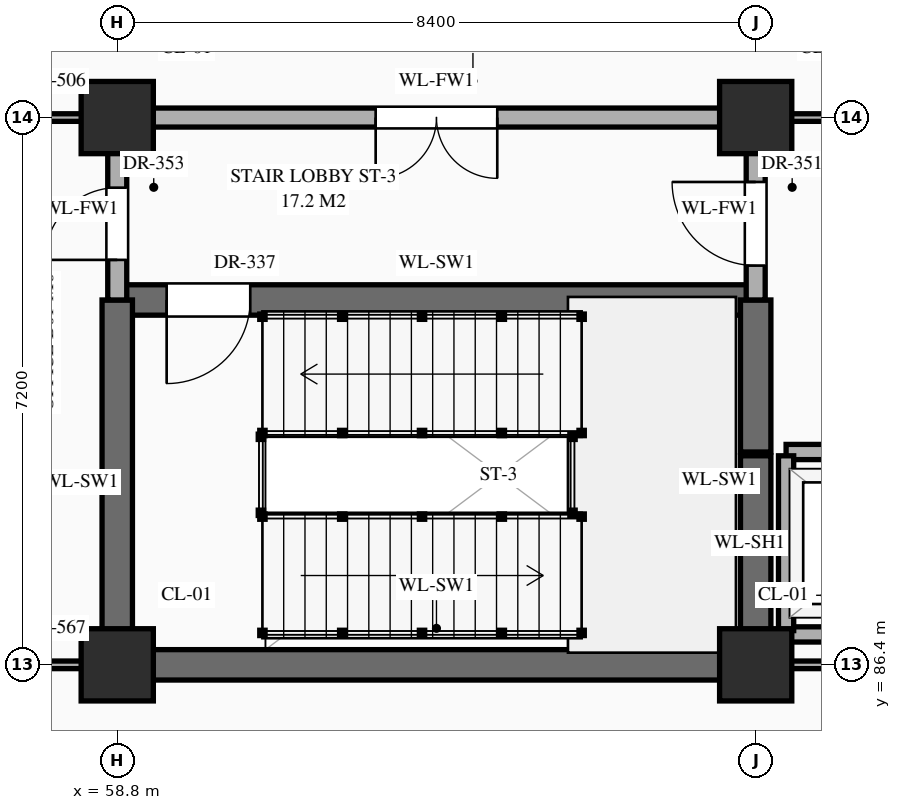
"""IFC4 building model, lengths in metres.
Left out: names, types, materials, properties, quantities, classifications, styles, units other than length and angle.
Written with IfcOpenShell. Run it as: python <this file> out.ifc"""

import sys

from ifc_helpers import new_model, si_unit, direction, frame, frame_2d, origin, origin_2d, place, context, subcontext, project, spatial, rectangle, extrude, element, fill, save


model = new_model("IFC4")
c1 = context("Model", 3, precision=1e-05, world=origin(), true_north=direction((0.0, 1.0)))
c2 = subcontext(c1, "Body", "Model", "MODEL_VIEW")
j1 = project(units=[si_unit("LENGTHUNIT", "METRE"), si_unit("PLANEANGLEUNIT", "RADIAN")], contexts=[c1])
p1 = place(None, origin())
s1 = spatial("IfcSite", under=j1, at=p1, CompositionType="ELEMENT")
p2 = place(p1, origin())
s2 = spatial("IfcBuilding", under=s1, at=p2, CompositionType="ELEMENT")
p3 = place(p2, frame((0.0, 0.0, -5.4)))
s3 = spatial("IfcBuildingStorey", under=s2, at=p3, CompositionType="ELEMENT", Elevation=-5.4)
for number, where, z_axis, x_axis in (
    (1, (58.8, 86.4, 0.0), (0.0, 0.0, 1.0), (1.0, 0.0, 0.0)),
    (2, (58.8, 93.6, 0.0), (0.0, 0.0, 1.0), (1.0, 0.0, 0.0)),
    (3, (67.2, 86.4, 0.0), (0.0, 0.0, 1.0), (1.0, 0.0, 0.0)),
    (4, (67.2, 93.6, 0.0), (0.0, 0.0, 1.0), (1.0, 0.0, 0.0)),
):
    element("IfcColumn", number, at=place(p3, frame(where, z_axis=z_axis, x_axis=x_axis)), inside=s3, PredefinedType="COLUMN", context=c2, shape_type="SweptSolid", body=[
        extrude(rectangle(XDim=0.95, YDim=0.95, at=origin_2d()), origin(), (0.0, 0.0, 1.0), 5.4),
    ])
p4 = place(p3, frame((50.4, 86.4, 0.0), z_axis=(0.0, 0.0, 1.0), x_axis=(1.0, 0.0, 0.0)))
e5 = element("IfcWall", 5, at=p4, inside=s3, PredefinedType="STANDARD", context=c2, shape_type="SweptSolid", body=[
    extrude(rectangle(XDim=8.4, YDim=0.1, at=frame_2d((4.2, 0.0))), origin(), (0.0, 0.0, 1.0), 4.25),
])
p5 = place(p4, frame((1.117, 0.0, 0.0)))
e6 = element("IfcOpeningElement", 6, at=p5, cuts=e5, PredefinedType="OPENING", context=c2, shape_type="SweptSolid", body=[
    extrude(rectangle(XDim=0.96, YDim=2.2, at=frame_2d((0.48, 1.1))), frame((0.0, 0.062, 0.0), z_axis=(0.0, -1.0, 0.0), x_axis=(1.0, 0.0, 0.0)), (0.0, 0.0, 1.0), 0.124),
])
p6 = place(p4, frame((3.68, 0.0, 0.0)))
e7 = element("IfcOpeningElement", 7, at=p6, cuts=e5, PredefinedType="OPENING", context=c2, shape_type="SweptSolid", body=[
    extrude(rectangle(XDim=1.04, YDim=2.2, at=frame_2d((0.52, 1.1))), frame((0.0, 0.062, 0.0), z_axis=(0.0, -1.0, 0.0), x_axis=(1.0, 0.0, 0.0)), (0.0, 0.0, 1.0), 0.124),
])
p7 = place(p4, frame((6.262, 0.0, 0.0)))
e8 = element("IfcOpeningElement", 8, at=p7, cuts=e5, PredefinedType="OPENING", context=c2, shape_type="SweptSolid", body=[
    extrude(rectangle(XDim=1.08, YDim=2.25, at=frame_2d((0.54, 1.125))), frame((0.0, 0.062, 0.0), z_axis=(0.0, -1.0, 0.0), x_axis=(1.0, 0.0, 0.0)), (0.0, 0.0, 1.0), 0.124),
])
p8 = place(p3, frame((58.8, 86.4, 0.0), z_axis=(0.0, 0.0, 1.0), x_axis=(1.0, 0.0, 0.0)))
e9 = element("IfcWall", 9, at=p8, inside=s3, PredefinedType="SHEAR", context=c2, shape_type="SweptSolid", body=[
    extrude(rectangle(XDim=8.4, YDim=0.4, at=frame_2d((4.2, 0.0))), origin(), (0.0, 0.0, 1.0), 5.1),
])
p9 = place(p3, frame((67.25, 86.4, 0.0), z_axis=(0.0, 0.0, 1.0), x_axis=(1.0, 0.0, 0.0)))
e10 = element("IfcWall", 10, at=p9, inside=s3, PredefinedType="STANDARD", context=c2, shape_type="SweptSolid", body=[
    extrude(rectangle(XDim=8.3, YDim=0.1, at=frame_2d((4.15, 0.0))), origin(), (0.0, 0.0, 1.0), 4.25),
])
p10 = place(p3, frame((67.6, 86.8, 0.0), z_axis=(0.0, 0.0, 1.0), x_axis=(1.0, 0.0, 0.0)))
e11 = element("IfcWall", 11, at=p10, inside=s3, PredefinedType="STANDARD", context=c2, shape_type="SweptSolid", body=[
    extrude(rectangle(XDim=2.5, YDim=0.2, at=frame_2d((1.25, 0.0))), origin(), (0.0, 0.0, 1.0), 5.1),
])
p11 = place(p3, frame((67.6, 89.2, 0.0), z_axis=(0.0, 0.0, 1.0), x_axis=(1.0, 0.0, 0.0)))
e12 = element("IfcWall", 12, at=p11, inside=s3, PredefinedType="STANDARD", context=c2, shape_type="SweptSolid", body=[
    extrude(rectangle(XDim=7.7, YDim=0.2, at=frame_2d((3.85, 0.0))), origin(), (0.0, 0.0, 1.0), 5.1),
])
p12 = place(p11, frame((0.725, 0.0, 0.0)))
e13 = element("IfcOpeningElement", 13, at=p12, cuts=e12, PredefinedType="OPENING", context=c2, shape_type="SweptSolid", body=[
    extrude(rectangle(XDim=1.1, YDim=2.15, at=frame_2d((0.55, 1.075))), frame((0.0, 0.112, 0.0), z_axis=(0.0, -1.0, 0.0), x_axis=(1.0, 0.0, 0.0)), (0.0, 0.0, 1.0), 0.224),
])
p13 = place(p11, frame((3.3, 0.0, 0.0)))
e14 = element("IfcOpeningElement", 14, at=p13, cuts=e12, PredefinedType="OPENING", context=c2, shape_type="SweptSolid", body=[
    extrude(rectangle(XDim=1.1, YDim=2.15, at=frame_2d((0.55, 1.075))), frame((0.0, 0.112, 0.0), z_axis=(0.0, -1.0, 0.0), x_axis=(1.0, 0.0, 0.0)), (0.0, 0.0, 1.0), 0.224),
])
p14 = place(p11, frame((5.875, 0.0, 0.0)))
e15 = element("IfcOpeningElement", 15, at=p14, cuts=e12, PredefinedType="OPENING", context=c2, shape_type="SweptSolid", body=[
    extrude(rectangle(XDim=1.1, YDim=2.15, at=frame_2d((0.55, 1.075))), frame((0.0, 0.112, 0.0), z_axis=(0.0, -1.0, 0.0), x_axis=(1.0, 0.0, 0.0)), (0.0, 0.0, 1.0), 0.224),
])
p15 = place(p3, frame((58.8, 91.2, 0.0), z_axis=(0.0, 0.0, 1.0), x_axis=(1.0, 0.0, 0.0)))
e16 = element("IfcWall", 16, at=p15, inside=s3, PredefinedType="SHEAR", context=c2, shape_type="SweptSolid", body=[
    extrude(rectangle(XDim=8.4, YDim=0.4, at=frame_2d((4.2, 0.0))), origin(), (0.0, 0.0, 1.0), 5.1),
])
p16 = place(p15, frame((0.65, 0.0, 0.0)))
e17 = element("IfcOpeningElement", 17, at=p16, cuts=e16, PredefinedType="OPENING", context=c2, shape_type="SweptSolid", body=[
    extrude(rectangle(XDim=1.1, YDim=2.2, at=frame_2d((0.55, 1.1))), frame((0.0, 0.212, 0.0), z_axis=(0.0, -1.0, 0.0), x_axis=(1.0, 0.0, 0.0)), (0.0, 0.0, 1.0), 0.424),
])
p17 = place(p3, frame((50.4, 93.6, 0.0), z_axis=(0.0, 0.0, 1.0), x_axis=(1.0, 0.0, 0.0)))
e18 = element("IfcWall", 18, at=p17, inside=s3, PredefinedType="STANDARD", context=c2, shape_type="SweptSolid", body=[
    extrude(rectangle(XDim=8.4, YDim=0.1, at=frame_2d((4.2, 0.0))), origin(), (0.0, 0.0, 1.0), 4.25),
])
p18 = place(p17, frame((0.958, 0.0, 0.0)))
e19 = element("IfcOpeningElement", 19, at=p18, cuts=e18, PredefinedType="OPENING", context=c2, shape_type="SweptSolid", body=[
    extrude(rectangle(XDim=1.28, YDim=2.35, at=frame_2d((0.64, 1.175))), frame((0.0, 0.062, 0.0), z_axis=(0.0, -1.0, 0.0), x_axis=(1.0, 0.0, 0.0)), (0.0, 0.0, 1.0), 0.124),
])
p19 = place(p17, frame((3.73, 0.0, 0.0)))
e20 = element("IfcOpeningElement", 20, at=p19, cuts=e18, PredefinedType="OPENING", context=c2, shape_type="SweptSolid", body=[
    extrude(rectangle(XDim=0.94, YDim=2.3, at=frame_2d((0.47, 1.15))), frame((0.0, 0.062, 0.0), z_axis=(0.0, -1.0, 0.0), x_axis=(1.0, 0.0, 0.0)), (0.0, 0.0, 1.0), 0.124),
])
p20 = place(p17, frame((6.312, 0.0, 0.0)))
e21 = element("IfcOpeningElement", 21, at=p20, cuts=e18, PredefinedType="OPENING", context=c2, shape_type="SweptSolid", body=[
    extrude(rectangle(XDim=0.98, YDim=2.35, at=frame_2d((0.49, 1.175))), frame((0.0, 0.062, 0.0), z_axis=(0.0, -1.0, 0.0), x_axis=(1.0, 0.0, 0.0)), (0.0, 0.0, 1.0), 0.124),
])
p21 = place(p3, frame((58.8, 93.6, 0.0), z_axis=(0.0, 0.0, 1.0), x_axis=(1.0, 0.0, 0.0)))
e22 = element("IfcWall", 22, at=p21, inside=s3, PredefinedType="STANDARD", context=c2, shape_type="SweptSolid", body=[
    extrude(rectangle(XDim=8.4, YDim=0.25, at=frame_2d((4.2, 0.0))), origin(), (0.0, 0.0, 1.0), 4.25),
])
p22 = place(p21, frame((3.4, 0.0, 0.0)))
e23 = element("IfcOpeningElement", 23, at=p22, cuts=e22, PredefinedType="OPENING", context=c2, shape_type="SweptSolid", body=[
    extrude(rectangle(XDim=1.6, YDim=2.3, at=frame_2d((0.8, 1.15))), frame((0.0, 0.137, 0.0), z_axis=(0.0, -1.0, 0.0), x_axis=(1.0, 0.0, 0.0)), (0.0, 0.0, 1.0), 0.274),
])
p23 = place(p3, frame((67.2, 93.6, 0.0), z_axis=(0.0, 0.0, 1.0), x_axis=(1.0, 0.0, 0.0)))
e24 = element("IfcWall", 24, at=p23, inside=s3, PredefinedType="STANDARD", context=c2, shape_type="SweptSolid", body=[
    extrude(rectangle(XDim=33.6, YDim=0.1, at=frame_2d((16.8, 0.0))), origin(), (0.0, 0.0, 1.0), 4.25),
])
p24 = place(p23, frame((3.425, 0.0, 0.0)))
e25 = element("IfcOpeningElement", 25, at=p24, cuts=e24, PredefinedType="OPENING", context=c2, shape_type="SweptSolid", body=[
    extrude(rectangle(XDim=1.55, YDim=2.35, at=frame_2d((0.775, 1.175))), frame((0.0, 0.062, 0.0), z_axis=(0.0, -1.0, 0.0), x_axis=(1.0, 0.0, 0.0)), (0.0, 0.0, 1.0), 0.124),
])
p25 = place(p23, frame((28.55, 0.0, 0.0)))
e26 = element("IfcOpeningElement", 26, at=p25, cuts=e24, PredefinedType="OPENING", context=c2, shape_type="SweptSolid", body=[
    extrude(rectangle(XDim=1.7, YDim=2.45, at=frame_2d((0.85, 1.225))), frame((0.0, 0.062, 0.0), z_axis=(0.0, -1.0, 0.0), x_axis=(1.0, 0.0, 0.0)), (0.0, 0.0, 1.0), 0.124),
])
p26 = place(p23, frame((11.875, 0.0, 0.0)))
e27 = element("IfcOpeningElement", 27, at=p26, cuts=e24, PredefinedType="OPENING", context=c2, shape_type="SweptSolid", body=[
    extrude(rectangle(XDim=1.45, YDim=2.3, at=frame_2d((0.725, 1.15))), frame((0.0, 0.062, 0.0), z_axis=(0.0, -1.0, 0.0), x_axis=(1.0, 0.0, 0.0)), (0.0, 0.0, 1.0), 0.124),
])
p27 = place(p23, frame((17.857, 0.0, 0.0)))
e28 = element("IfcOpeningElement", 28, at=p27, cuts=e24, PredefinedType="OPENING", context=c2, shape_type="SweptSolid", body=[
    extrude(rectangle(XDim=1.08, YDim=2.25, at=frame_2d((0.54, 1.125))), frame((0.0, 0.062, 0.0), z_axis=(0.0, -1.0, 0.0), x_axis=(1.0, 0.0, 0.0)), (0.0, 0.0, 1.0), 0.124),
])
p28 = place(p23, frame((20.44, 0.0, 0.0)))
e29 = element("IfcOpeningElement", 29, at=p28, cuts=e24, PredefinedType="OPENING", context=c2, shape_type="SweptSolid", body=[
    extrude(rectangle(XDim=1.12, YDim=2.25, at=frame_2d((0.56, 1.125))), frame((0.0, 0.062, 0.0), z_axis=(0.0, -1.0, 0.0), x_axis=(1.0, 0.0, 0.0)), (0.0, 0.0, 1.0), 0.124),
])
p29 = place(p23, frame((23.022, 0.0, 0.0)))
e30 = element("IfcOpeningElement", 30, at=p29, cuts=e24, PredefinedType="OPENING", context=c2, shape_type="SweptSolid", body=[
    extrude(rectangle(XDim=1.16, YDim=2.3, at=frame_2d((0.58, 1.15))), frame((0.0, 0.062, 0.0), z_axis=(0.0, -1.0, 0.0), x_axis=(1.0, 0.0, 0.0)), (0.0, 0.0, 1.0), 0.124),
])
p30 = place(p3, frame((58.8, 86.4, 0.0), z_axis=(0.0, 0.0, 1.0), x_axis=(0.0, 1.0, 0.0)))
e31 = element("IfcWall", 31, at=p30, inside=s3, PredefinedType="SHEAR", context=c2, shape_type="SweptSolid", body=[
    extrude(rectangle(XDim=4.8, YDim=0.4, at=frame_2d((2.4, 0.0))), origin(), (0.0, 0.0, 1.0), 5.1),
])
p31 = place(p3, frame((58.8, 91.2, 0.0), z_axis=(0.0, 0.0, 1.0), x_axis=(0.0, 1.0, 0.0)))
e32 = element("IfcWall", 32, at=p31, inside=s3, PredefinedType="STANDARD", context=c2, shape_type="SweptSolid", body=[
    extrude(rectangle(XDim=2.4, YDim=0.25, at=frame_2d((1.2, 0.0))), origin(), (0.0, 0.0, 1.0), 4.35),
])
p32 = place(p31, frame((0.528, 0.0, 0.0)))
e33 = element("IfcOpeningElement", 33, at=p32, cuts=e32, PredefinedType="OPENING", context=c2, shape_type="SweptSolid", body=[
    extrude(rectangle(XDim=0.95, YDim=2.15, at=frame_2d((0.475, 1.075))), frame((0.0, 0.137, 0.0), z_axis=(0.0, -1.0, 0.0), x_axis=(1.0, 0.0, 0.0)), (0.0, 0.0, 1.0), 0.274),
])
p33 = place(p3, frame((67.2, 86.45, 0.0), z_axis=(0.0, 0.0, 1.0), x_axis=(0.0, 1.0, 0.0)))
e34 = element("IfcWall", 34, at=p33, inside=s3, PredefinedType="SHEAR", context=c2, shape_type="SweptSolid", body=[
    extrude(rectangle(XDim=2.7, YDim=0.4, at=frame_2d((1.35, 0.0))), origin(), (0.0, 0.0, 1.0), 5.1),
])
p34 = place(p3, frame((67.2, 89.2, 0.0), z_axis=(0.0, 0.0, 1.0), x_axis=(0.0, 1.0, 0.0)))
e35 = element("IfcWall", 35, at=p34, inside=s3, PredefinedType="SHEAR", context=c2, shape_type="SweptSolid", body=[
    extrude(rectangle(XDim=2.0, YDim=0.4, at=frame_2d((1.0, 0.0))), origin(), (0.0, 0.0, 1.0), 5.1),
])
p35 = place(p3, frame((67.2, 91.2, 0.0), z_axis=(0.0, 0.0, 1.0), x_axis=(0.0, 1.0, 0.0)))
e36 = element("IfcWall", 36, at=p35, inside=s3, PredefinedType="STANDARD", context=c2, shape_type="SweptSolid", body=[
    extrude(rectangle(XDim=2.4, YDim=0.25, at=frame_2d((1.2, 0.0))), origin(), (0.0, 0.0, 1.0), 4.35),
])
p36 = place(p35, frame((0.452, 0.0, 0.0)))
e37 = element("IfcOpeningElement", 37, at=p36, cuts=e36, PredefinedType="OPENING", context=c2, shape_type="SweptSolid", body=[
    extrude(rectangle(XDim=1.1, YDim=2.2, at=frame_2d((0.55, 1.1))), frame((0.0, 0.137, 0.0), z_axis=(0.0, -1.0, 0.0), x_axis=(1.0, 0.0, 0.0)), (0.0, 0.0, 1.0), 0.274),
])
p37 = place(p3, frame((67.6, 86.85, 0.0), z_axis=(0.0, 0.0, 1.0), x_axis=(0.0, 1.0, 0.0)))
e38 = element("IfcWall", 38, at=p37, inside=s3, PredefinedType="STANDARD", context=c2, shape_type="SweptSolid", body=[
    extrude(rectangle(XDim=2.3, YDim=0.2, at=frame_2d((1.15, 0.0))), origin(), (0.0, 0.0, 1.0), 5.1),
])
p38 = place(p16, frame((1.1, 0.0, 0.0), z_axis=(0.0, 0.0, 1.0), x_axis=(-1.0, 0.0, 0.0)))
e39 = element("IfcDoor", 39, at=p38, inside=s3, OperationType="SINGLE_SWING_RIGHT", PredefinedType="DOOR", context=c2, shape_type="SweptSolid", body=[
    extrude(rectangle(XDim=1.1, YDim=2.2, at=frame_2d((0.55, 1.1))), frame((0.0, 0.025, 0.0), z_axis=(0.0, -1.0, 0.0), x_axis=(1.0, 0.0, 0.0)), (0.0, 0.0, 1.0), 0.05),
])
fill(e17, e39)
p39 = place(p36, origin())
e40 = element("IfcDoor", 40, at=p39, inside=s3, OperationType="SINGLE_SWING_RIGHT", PredefinedType="DOOR", context=c2, shape_type="SweptSolid", body=[
    extrude(rectangle(XDim=1.1, YDim=2.2, at=frame_2d((0.55, 1.1))), frame((0.0, 0.025, 0.0), z_axis=(0.0, -1.0, 0.0), x_axis=(1.0, 0.0, 0.0)), (0.0, 0.0, 1.0), 0.05),
])
fill(e37, e40)
p40 = place(p22, frame((1.6, 0.0, 0.0), z_axis=(0.0, 0.0, 1.0), x_axis=(-1.0, 0.0, 0.0)))
e41 = element("IfcDoor", 41, at=p40, inside=s3, OperationType="DOUBLE_DOOR_SINGLE_SWING", PredefinedType="DOOR", context=c2, shape_type="SweptSolid", body=[
    extrude(rectangle(XDim=1.6, YDim=2.3, at=frame_2d((0.8, 1.15))), frame((0.0, 0.025, 0.0), z_axis=(0.0, -1.0, 0.0), x_axis=(1.0, 0.0, 0.0)), (0.0, 0.0, 1.0), 0.05),
])
fill(e23, e41)
p41 = place(p32, origin())
e42 = element("IfcDoor", 42, at=p41, inside=s3, OperationType="SINGLE_SWING_LEFT", PredefinedType="DOOR", context=c2, shape_type="SweptSolid", body=[
    extrude(rectangle(XDim=0.95, YDim=2.15, at=frame_2d((0.475, 1.075))), frame((0.0, 0.025, 0.0), z_axis=(0.0, -1.0, 0.0), x_axis=(1.0, 0.0, 0.0)), (0.0, 0.0, 1.0), 0.05),
])
fill(e33, e42)
save(model, sys.argv[1])
